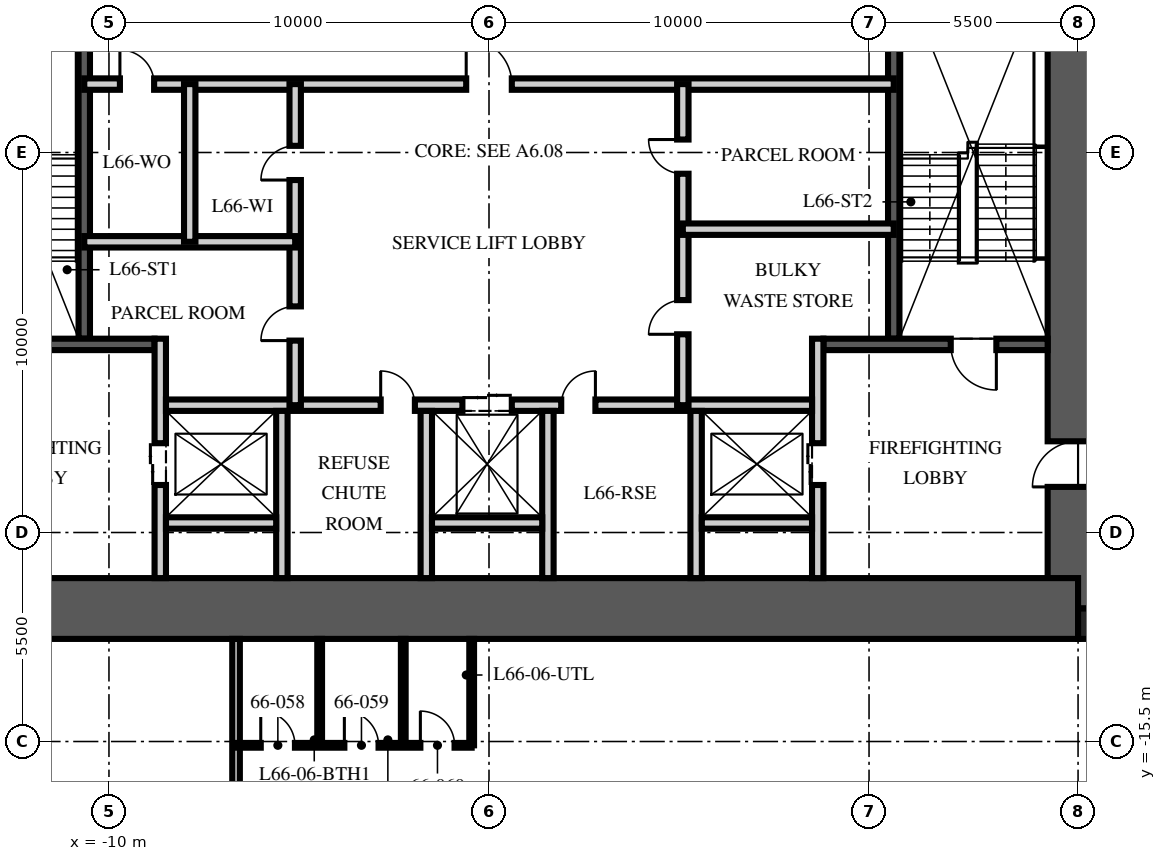
"""IFC4 building model, lengths in metres.
Left out: names, types, materials, properties, quantities, classifications, styles, units other than length and angle.
Written with IfcOpenShell. Run it as: python <this file> out.ifc"""

import sys

from ifc_helpers import new_model, si_unit, direction, frame, frame_2d, origin, origin_2d, place, context, subcontext, project, spatial, rectangle, extrude, element, fill, save


model = new_model("IFC4")
c1 = context("Model", 3, precision=1e-05, world=origin(), true_north=direction((0.0, 1.0)))
c2 = subcontext(c1, "Body", "Model", "MODEL_VIEW")
j1 = project(units=[si_unit("LENGTHUNIT", "METRE"), si_unit("PLANEANGLEUNIT", "RADIAN")], contexts=[c1])
p1 = place(None, origin())
s1 = spatial("IfcSite", under=j1, at=p1, CompositionType="ELEMENT")
p2 = place(p1, origin())
s2 = spatial("IfcBuilding", under=s1, at=p2, CompositionType="ELEMENT")
p3 = place(p2, frame((0.0, 0.0, 263.25)))
s3 = spatial("IfcBuildingStorey", under=s2, at=p3, CompositionType="ELEMENT", Elevation=263.25)
p4 = place(p3, frame((15.5, -12.0, -0.25), z_axis=(0.0, 0.0, 1.0), x_axis=(0.0, 1.0, 0.0)))
e1 = element("IfcWall", 1, at=p4, inside=s3, PredefinedType="SHEAR", context=c2, shape_type="SweptSolid", body=[
    extrude(rectangle(XDim=24.0, YDim=1.6, at=frame_2d((12.0, 0.0))), origin(), (0.0, 0.0, 1.0), 3.75),
])
p5 = place(p4, frame((3.2, 0.0, 0.25)))
e2 = element("IfcOpeningElement", 2, at=p5, cuts=e1, PredefinedType="OPENING", context=c2, shape_type="SweptSolid", body=[
    extrude(rectangle(XDim=1.2, YDim=2.1, at=frame_2d((0.6, 1.05))), frame((0.0, 0.81, 0.0), z_axis=(0.0, -1.0, 0.0), x_axis=(1.0, 0.0, 0.0)), (0.0, 0.0, 1.0), 1.62),
])
p6 = place(p4, frame((19.3, 0.0, 0.25)))
e3 = element("IfcOpeningElement", 3, at=p6, cuts=e1, PredefinedType="OPENING", context=c2, shape_type="SweptSolid", body=[
    extrude(rectangle(XDim=1.8, YDim=2.1, at=frame_2d((0.9, 1.05))), frame((0.0, 0.81, 0.0), z_axis=(0.0, -1.0, 0.0), x_axis=(1.0, 0.0, 0.0)), (0.0, 0.0, 1.0), 1.62),
])
p7 = place(p3, frame((-15.5, -12.0, -0.25), z_axis=(0.0, 0.0, 1.0), x_axis=(1.0, 0.0, 0.0)))
e4 = element("IfcWall", 4, at=p7, inside=s3, PredefinedType="SHEAR", context=c2, shape_type="SweptSolid", body=[
    extrude(rectangle(XDim=31.0, YDim=1.6, at=frame_2d((15.5, 0.0))), origin(), (0.0, 0.0, 1.0), 3.75),
])
p8 = place(p3, frame((15.9, -12.4, -0.25), z_axis=(0.0, 0.0, 1.0), x_axis=(1.0, 0.0, 0.0)))
e5 = element("IfcColumn", 5, at=p8, inside=s3, PredefinedType="COLUMN", context=c2, shape_type="SweptSolid", body=[
    extrude(rectangle(XDim=0.8, YDim=0.8, at=origin_2d()), origin(), (0.0, 0.0, 1.0), 3.75),
])
p9 = place(p3, frame((-10.65, -4.9, 0.0), z_axis=(0.0, 0.0, 1.0), x_axis=(0.0, 1.0, 0.0)))
e6 = element("IfcWall", 6, at=p9, inside=s3, PredefinedType="SOLIDWALL", context=c2, shape_type="SweptSolid", body=[
    extrude(rectangle(XDim=10.1, YDim=0.3, at=frame_2d((5.05, 0.0))), origin(), (0.0, 0.0, 1.0), 3.5),
])
p10 = place(p3, frame((-14.7, -5.05, 0.0), z_axis=(0.0, 0.0, 1.0), x_axis=(1.0, 0.0, 0.0)))
e7 = element("IfcWall", 7, at=p10, inside=s3, PredefinedType="SOLIDWALL", context=c2, shape_type="SweptSolid", body=[
    extrude(rectangle(XDim=5.9, YDim=0.3, at=frame_2d((2.95, 0.0))), origin(), (0.0, 0.0, 1.0), 3.5),
])
p11 = place(p10, frame((1.35, 0.0, 0.0)))
e8 = element("IfcOpeningElement", 8, at=p11, cuts=e7, PredefinedType="OPENING", context=c2, shape_type="SweptSolid", body=[
    extrude(rectangle(XDim=1.2, YDim=2.1, at=frame_2d((0.6, 1.05))), frame((0.0, 0.16, 0.0), z_axis=(0.0, -1.0, 0.0), x_axis=(1.0, 0.0, 0.0)), (0.0, 0.0, 1.0), 0.32),
])
p12 = place(p3, frame((-8.65, -11.2, 0.0), z_axis=(0.0, 0.0, 1.0), x_axis=(0.0, 1.0, 0.0)))
e9 = element("IfcWall", 9, at=p12, inside=s3, PredefinedType="PARTITIONING", context=c2, shape_type="SweptSolid", body=[
    extrude(rectangle(XDim=6.3, YDim=0.3, at=frame_2d((3.15, 0.0))), origin(), (0.0, 0.0, 1.0), 3.5),
])
p13 = place(p12, frame((2.45, 0.0, 0.0)))
e10 = element("IfcOpeningElement", 10, at=p13, cuts=e9, PredefinedType="OPENING", context=c2, shape_type="SweptSolid", body=[
    extrude(rectangle(XDim=1.1, YDim=2.1, at=frame_2d((0.55, 1.05))), frame((0.0, 0.16, 0.0), z_axis=(0.0, -1.0, 0.0), x_axis=(1.0, 0.0, 0.0)), (0.0, 0.0, 1.0), 0.32),
])
p14 = place(p3, frame((10.65, -4.9, 0.0), z_axis=(0.0, 0.0, 1.0), x_axis=(0.0, 1.0, 0.0)))
e11 = element("IfcWall", 11, at=p14, inside=s3, PredefinedType="SOLIDWALL", context=c2, shape_type="SweptSolid", body=[
    extrude(rectangle(XDim=10.1, YDim=0.3, at=frame_2d((5.05, 0.0))), origin(), (0.0, 0.0, 1.0), 3.5),
])
p15 = place(p3, frame((14.7, -5.05, 0.0), z_axis=(0.0, 0.0, 1.0), x_axis=(-1.0, 0.0, 0.0)))
e12 = element("IfcWall", 12, at=p15, inside=s3, PredefinedType="SOLIDWALL", context=c2, shape_type="SweptSolid", body=[
    extrude(rectangle(XDim=5.9, YDim=0.3, at=frame_2d((2.95, 0.0))), origin(), (0.0, 0.0, 1.0), 3.5),
])
p16 = place(p15, frame((1.35, 0.0, 0.0)))
e13 = element("IfcOpeningElement", 13, at=p16, cuts=e12, PredefinedType="OPENING", context=c2, shape_type="SweptSolid", body=[
    extrude(rectangle(XDim=1.2, YDim=2.1, at=frame_2d((0.6, 1.05))), frame((0.0, 0.16, 0.0), z_axis=(0.0, -1.0, 0.0), x_axis=(1.0, 0.0, 0.0)), (0.0, 0.0, 1.0), 0.32),
])
p17 = place(p3, frame((8.65, -11.2, 0.0), z_axis=(0.0, 0.0, 1.0), x_axis=(0.0, 1.0, 0.0)))
e14 = element("IfcWall", 14, at=p17, inside=s3, PredefinedType="PARTITIONING", context=c2, shape_type="SweptSolid", body=[
    extrude(rectangle(XDim=6.3, YDim=0.3, at=frame_2d((3.15, 0.0))), origin(), (0.0, 0.0, 1.0), 3.5),
])
p18 = place(p17, frame((2.45, 0.0, 0.0)))
e15 = element("IfcOpeningElement", 15, at=p18, cuts=e14, PredefinedType="OPENING", context=c2, shape_type="SweptSolid", body=[
    extrude(rectangle(XDim=1.1, YDim=2.1, at=frame_2d((0.55, 1.05))), frame((0.0, 0.16, 0.0), z_axis=(0.0, -1.0, 0.0), x_axis=(1.0, 0.0, 0.0)), (0.0, 0.0, 1.0), 0.32),
])
p19 = place(p3, frame((-8.5, -6.65, 0.0), z_axis=(0.0, 0.0, 1.0), x_axis=(1.0, 0.0, 0.0)))
e16 = element("IfcWall", 16, at=p19, inside=s3, PredefinedType="PARTITIONING", context=c2, shape_type="SweptSolid", body=[
    extrude(rectangle(XDim=17.0, YDim=0.3, at=frame_2d((8.5, 0.0))), origin(), (0.0, 0.0, 1.0), 3.5),
])
p20 = place(p19, frame((7.8, 0.0, 0.0)))
e17 = element("IfcOpeningElement", 17, at=p20, cuts=e16, PredefinedType="OPENING", context=c2, shape_type="SweptSolid", body=[
    extrude(rectangle(XDim=1.3, YDim=2.4, at=frame_2d((0.65, 1.2))), frame((0.0, 0.16, 0.0), z_axis=(0.0, -1.0, 0.0), x_axis=(1.0, 0.0, 0.0)), (0.0, 0.0, 1.0), 0.32),
])
p21 = place(p19, frame((5.65, 0.0, 0.0)))
e18 = element("IfcOpeningElement", 18, at=p21, cuts=e16, PredefinedType="OPENING", context=c2, shape_type="SweptSolid", body=[
    extrude(rectangle(XDim=0.9, YDim=2.1, at=frame_2d((0.45, 1.05))), frame((0.0, 0.16, 0.0), z_axis=(0.0, -1.0, 0.0), x_axis=(1.0, 0.0, 0.0)), (0.0, 0.0, 1.0), 0.32),
])
p22 = place(p19, frame((10.4, 0.0, 0.0)))
e19 = element("IfcOpeningElement", 19, at=p22, cuts=e16, PredefinedType="OPENING", context=c2, shape_type="SweptSolid", body=[
    extrude(rectangle(XDim=0.9, YDim=2.1, at=frame_2d((0.45, 1.05))), frame((0.0, 0.16, 0.0), z_axis=(0.0, -1.0, 0.0), x_axis=(1.0, 0.0, 0.0)), (0.0, 0.0, 1.0), 0.32),
])
for number, where, z_axis, x_axis in (
    (20, (-5.45, -11.2, 0.0), (0.0, 0.0, 1.0), (0.0, 1.0, 0.0)),
    (21, (-1.65, -11.2, 0.0), (0.0, 0.0, 1.0), (0.0, 1.0, 0.0)),
    (22, (1.55, -11.2, 0.0), (0.0, 0.0, 1.0), (0.0, 1.0, 0.0)),
    (23, (5.45, -11.2, 0.0), (0.0, 0.0, 1.0), (0.0, 1.0, 0.0)),
):
    element("IfcWall", number, at=place(p3, frame(where, z_axis=z_axis, x_axis=x_axis)), inside=s3, PredefinedType="PARTITIONING", context=c2, shape_type="SweptSolid", body=[
        extrude(rectangle(XDim=4.4, YDim=0.3, at=frame_2d((2.2, 0.0))), origin(), (0.0, 0.0, 1.0), 3.5),
    ])
for number, where, z_axis, x_axis in (
    (24, (-8.5, -9.75, 0.0), (0.0, 0.0, 1.0), (1.0, 0.0, 0.0)),
    (25, (-1.5, -9.75, 0.0), (0.0, 0.0, 1.0), (1.0, 0.0, 0.0)),
    (26, (5.6, -9.75, 0.0), (0.0, 0.0, 1.0), (1.0, 0.0, 0.0)),
):
    element("IfcWall", number, at=place(p3, frame(where, z_axis=z_axis, x_axis=x_axis)), inside=s3, PredefinedType="PARTITIONING", context=c2, shape_type="SweptSolid", body=[
        extrude(rectangle(XDim=2.9, YDim=0.3, at=frame_2d((1.45, 0.0))), origin(), (0.0, 0.0, 1.0), 3.5),
    ])
p23 = place(p3, frame((-10.65, 1.8, 0.0), z_axis=(0.0, 0.0, 1.0), x_axis=(1.0, 0.0, 0.0)))
e27 = element("IfcWall", 27, at=p23, inside=s3, PredefinedType="PARTITIONING", context=c2, shape_type="SweptSolid", body=[
    extrude(rectangle(XDim=21.3, YDim=0.3, at=frame_2d((10.65, 0.0))), origin(), (0.0, 0.0, 1.0), 3.5),
])
p24 = place(p23, frame((10.05, 0.0, 0.0)))
e28 = element("IfcOpeningElement", 28, at=p24, cuts=e27, PredefinedType="OPENING", context=c2, shape_type="SweptSolid", body=[
    extrude(rectangle(XDim=1.2, YDim=2.1, at=frame_2d((0.6, 1.05))), frame((0.0, 0.16, 0.0), z_axis=(0.0, -1.0, 0.0), x_axis=(1.0, 0.0, 0.0)), (0.0, 0.0, 1.0), 0.32),
])
p25 = place(p23, frame((0.938, 0.0, 0.0)))
e29 = element("IfcOpeningElement", 29, at=p25, cuts=e27, PredefinedType="OPENING", context=c2, shape_type="SweptSolid", body=[
    extrude(rectangle(XDim=0.9, YDim=2.1, at=frame_2d((0.45, 1.05))), frame((0.0, 0.16, 0.0), z_axis=(0.0, -1.0, 0.0), x_axis=(1.0, 0.0, 0.0)), (0.0, 0.0, 1.0), 0.32),
])
p26 = place(p3, frame((-5.1, -6.65, 0.0), z_axis=(0.0, 0.0, 1.0), x_axis=(0.0, 1.0, 0.0)))
e30 = element("IfcWall", 30, at=p26, inside=s3, PredefinedType="PARTITIONING", context=c2, shape_type="SweptSolid", body=[
    extrude(rectangle(XDim=8.45, YDim=0.3, at=frame_2d((4.225, 0.0))), origin(), (0.0, 0.0, 1.0), 3.5),
])
p27 = place(p26, frame((1.7, 0.0, 0.0)))
e31 = element("IfcOpeningElement", 31, at=p27, cuts=e30, PredefinedType="OPENING", context=c2, shape_type="SweptSolid", body=[
    extrude(rectangle(XDim=0.9, YDim=2.1, at=frame_2d((0.45, 1.05))), frame((0.0, 0.16, 0.0), z_axis=(0.0, -1.0, 0.0), x_axis=(1.0, 0.0, 0.0)), (0.0, 0.0, 1.0), 0.32),
])
p28 = place(p26, frame((5.925, 0.0, 0.0)))
e32 = element("IfcOpeningElement", 32, at=p28, cuts=e30, PredefinedType="OPENING", context=c2, shape_type="SweptSolid", body=[
    extrude(rectangle(XDim=0.9, YDim=2.1, at=frame_2d((0.45, 1.05))), frame((0.0, 0.16, 0.0), z_axis=(0.0, -1.0, 0.0), x_axis=(1.0, 0.0, 0.0)), (0.0, 0.0, 1.0), 0.32),
])
p29 = place(p3, frame((5.1, -6.65, 0.0), z_axis=(0.0, 0.0, 1.0), x_axis=(0.0, 1.0, 0.0)))
e33 = element("IfcWall", 33, at=p29, inside=s3, PredefinedType="PARTITIONING", context=c2, shape_type="SweptSolid", body=[
    extrude(rectangle(XDim=8.45, YDim=0.3, at=frame_2d((4.225, 0.0))), origin(), (0.0, 0.0, 1.0), 3.5),
])
p30 = place(p29, frame((1.866, 0.0, 0.0)))
e34 = element("IfcOpeningElement", 34, at=p30, cuts=e33, PredefinedType="OPENING", context=c2, shape_type="SweptSolid", body=[
    extrude(rectangle(XDim=0.9, YDim=2.1, at=frame_2d((0.45, 1.05))), frame((0.0, 0.16, 0.0), z_axis=(0.0, -1.0, 0.0), x_axis=(1.0, 0.0, 0.0)), (0.0, 0.0, 1.0), 0.32),
])
p31 = place(p29, frame((6.091, 0.0, 0.0)))
e35 = element("IfcOpeningElement", 35, at=p31, cuts=e33, PredefinedType="OPENING", context=c2, shape_type="SweptSolid", body=[
    extrude(rectangle(XDim=0.9, YDim=2.1, at=frame_2d((0.45, 1.05))), frame((0.0, 0.16, 0.0), z_axis=(0.0, -1.0, 0.0), x_axis=(1.0, 0.0, 0.0)), (0.0, 0.0, 1.0), 0.32),
])
p32 = place(p3, frame((-10.65, -2.35, 0.0), z_axis=(0.0, 0.0, 1.0), x_axis=(1.0, 0.0, 0.0)))
e36 = element("IfcWall", 36, at=p32, inside=s3, PredefinedType="PARTITIONING", context=c2, shape_type="SweptSolid", body=[
    extrude(rectangle(XDim=5.55, YDim=0.3, at=frame_2d((2.775, 0.0))), origin(), (0.0, 0.0, 1.0), 3.5),
])
p33 = place(p3, frame((-7.875, -2.35, 0.0), z_axis=(0.0, 0.0, 1.0), x_axis=(0.0, 1.0, 0.0)))
e37 = element("IfcWall", 37, at=p33, inside=s3, PredefinedType="PARTITIONING", context=c2, shape_type="SweptSolid", body=[
    extrude(rectangle(XDim=4.15, YDim=0.3, at=frame_2d((2.075, 0.0))), origin(), (0.0, 0.0, 1.0), 3.5),
])
p34 = place(p3, frame((10.65, -2.018, 0.0), z_axis=(0.0, 0.0, 1.0), x_axis=(-1.0, 0.0, 0.0)))
e38 = element("IfcWall", 38, at=p34, inside=s3, PredefinedType="PARTITIONING", context=c2, shape_type="SweptSolid", body=[
    extrude(rectangle(XDim=5.55, YDim=0.3, at=frame_2d((2.775, 0.0))), origin(), (0.0, 0.0, 1.0), 3.5),
])
p35 = place(p3, frame((-6.656, -12.8, 0.0), z_axis=(0.0, 0.0, 1.0), x_axis=(0.0, -1.0, 0.0)))
e39 = element("IfcWall", 39, at=p35, inside=s3, PredefinedType="PARTITIONING", context=c2, shape_type="SweptSolid", body=[
    extrude(rectangle(XDim=12.65, YDim=0.2, at=frame_2d((6.325, 0.0))), origin(), (0.0, 0.0, 1.0), 2.91),
])
p36 = place(p3, frame((-6.656, -15.6, 0.0), z_axis=(0.0, 0.0, 1.0), x_axis=(1.0, 0.0, 0.0)))
e40 = element("IfcWall", 40, at=p36, inside=s3, PredefinedType="PARTITIONING", context=c2, shape_type="SweptSolid", body=[
    extrude(rectangle(XDim=6.2, YDim=0.125, at=frame_2d((3.1, 0.0))), origin(), (0.0, 0.0, 1.0), 2.81),
])
p37 = place(p36, frame((0.65, 0.0, 0.0)))
e41 = element("IfcOpeningElement", 41, at=p37, cuts=e40, PredefinedType="OPENING", context=c2, shape_type="SweptSolid", body=[
    extrude(rectangle(XDim=0.9, YDim=2.1, at=frame_2d((0.45, 1.05))), frame((0.0, 0.073, 0.0), z_axis=(0.0, -1.0, 0.0), x_axis=(1.0, 0.0, 0.0)), (0.0, 0.0, 1.0), 0.145),
])
p38 = place(p36, frame((2.85, 0.0, 0.0)))
e42 = element("IfcOpeningElement", 42, at=p38, cuts=e40, PredefinedType="OPENING", context=c2, shape_type="SweptSolid", body=[
    extrude(rectangle(XDim=0.9, YDim=2.1, at=frame_2d((0.45, 1.05))), frame((0.0, 0.073, 0.0), z_axis=(0.0, -1.0, 0.0), x_axis=(1.0, 0.0, 0.0)), (0.0, 0.0, 1.0), 0.145),
])
p39 = place(p36, frame((4.85, 0.0, 0.0)))
e43 = element("IfcOpeningElement", 43, at=p39, cuts=e40, PredefinedType="OPENING", context=c2, shape_type="SweptSolid", body=[
    extrude(rectangle(XDim=0.9, YDim=2.1, at=frame_2d((0.45, 1.05))), frame((0.0, 0.073, 0.0), z_axis=(0.0, -1.0, 0.0), x_axis=(1.0, 0.0, 0.0)), (0.0, 0.0, 1.0), 0.145),
])
for number, where, z_axis, x_axis in (
    (44, (-4.456, -12.8, 0.0), (0.0, 0.0, 1.0), (0.0, -1.0, 0.0)),
    (45, (-2.256, -12.8, 0.0), (0.0, 0.0, 1.0), (0.0, -1.0, 0.0)),
    (46, (-0.456, -12.8, 0.0), (0.0, 0.0, 1.0), (0.0, -1.0, 0.0)),
):
    element("IfcWall", number, at=place(p3, frame(where, z_axis=z_axis, x_axis=x_axis)), inside=s3, PredefinedType="PARTITIONING", context=c2, shape_type="SweptSolid", body=[
        extrude(rectangle(XDim=2.8, YDim=0.125, at=frame_2d((1.4, 0.0))), origin(), (0.0, 0.0, 1.0), 3.5),
    ])
p40 = place(p16, origin())
e47 = element("IfcDoor", 47, at=p40, inside=s3, OperationType="SINGLE_SWING_LEFT", PredefinedType="DOOR", context=c2, shape_type="SweptSolid", body=[
    extrude(rectangle(XDim=1.2, YDim=2.1, at=frame_2d((0.6, 1.05))), frame((0.0, 0.025, 0.0), z_axis=(0.0, -1.0, 0.0), x_axis=(1.0, 0.0, 0.0)), (0.0, 0.0, 1.0), 0.05),
])
fill(e13, e47)
p41 = place(p5, origin())
e48 = element("IfcDoor", 48, at=p41, inside=s3, OperationType="SINGLE_SWING_LEFT", PredefinedType="DOOR", context=c2, shape_type="SweptSolid", body=[
    extrude(rectangle(XDim=1.2, YDim=2.1, at=frame_2d((0.6, 1.05))), frame((0.0, 0.025, 0.0), z_axis=(0.0, -1.0, 0.0), x_axis=(1.0, 0.0, 0.0)), (0.0, 0.0, 1.0), 0.05),
])
fill(e2, e48)
p42 = place(p13, origin())
e49 = element("IfcDoor", 49, at=p42, inside=s3, OperationType="DOUBLE_DOOR_SLIDING", PredefinedType="DOOR", context=c2, shape_type="SweptSolid", body=[
    extrude(rectangle(XDim=1.1, YDim=2.1, at=frame_2d((0.55, 1.05))), frame((0.0, 0.025, 0.0), z_axis=(0.0, -1.0, 0.0), x_axis=(1.0, 0.0, 0.0)), (0.0, 0.0, 1.0), 0.05),
])
fill(e10, e49)
p43 = place(p18, origin())
e50 = element("IfcDoor", 50, at=p43, inside=s3, OperationType="DOUBLE_DOOR_SLIDING", PredefinedType="DOOR", context=c2, shape_type="SweptSolid", body=[
    extrude(rectangle(XDim=1.1, YDim=2.1, at=frame_2d((0.55, 1.05))), frame((0.0, 0.025, 0.0), z_axis=(0.0, -1.0, 0.0), x_axis=(1.0, 0.0, 0.0)), (0.0, 0.0, 1.0), 0.05),
])
fill(e15, e50)
p44 = place(p20, origin())
e51 = element("IfcDoor", 51, at=p44, inside=s3, OperationType="DOUBLE_DOOR_SLIDING", PredefinedType="DOOR", context=c2, shape_type="SweptSolid", body=[
    extrude(rectangle(XDim=1.3, YDim=2.4, at=frame_2d((0.65, 1.2))), frame((0.0, 0.025, 0.0), z_axis=(0.0, -1.0, 0.0), x_axis=(1.0, 0.0, 0.0)), (0.0, 0.0, 1.0), 0.05),
])
fill(e17, e51)
p45 = place(p24, origin())
e52 = element("IfcDoor", 52, at=p45, inside=s3, OperationType="SINGLE_SWING_LEFT", PredefinedType="DOOR", context=c2, shape_type="SweptSolid", body=[
    extrude(rectangle(XDim=1.2, YDim=2.1, at=frame_2d((0.6, 1.05))), frame((0.0, 0.025, 0.0), z_axis=(0.0, -1.0, 0.0), x_axis=(1.0, 0.0, 0.0)), (0.0, 0.0, 1.0), 0.05),
])
fill(e28, e52)
p46 = place(p21, origin())
e53 = element("IfcDoor", 53, at=p46, inside=s3, OperationType="SINGLE_SWING_LEFT", PredefinedType="DOOR", context=c2, shape_type="SweptSolid", body=[
    extrude(rectangle(XDim=0.9, YDim=2.1, at=frame_2d((0.45, 1.05))), frame((0.0, 0.025, 0.0), z_axis=(0.0, -1.0, 0.0), x_axis=(1.0, 0.0, 0.0)), (0.0, 0.0, 1.0), 0.05),
])
fill(e18, e53)
p47 = place(p22, origin())
e54 = element("IfcDoor", 54, at=p47, inside=s3, OperationType="SINGLE_SWING_RIGHT", PredefinedType="DOOR", context=c2, shape_type="SweptSolid", body=[
    extrude(rectangle(XDim=0.9, YDim=2.1, at=frame_2d((0.45, 1.05))), frame((0.0, 0.025, 0.0), z_axis=(0.0, -1.0, 0.0), x_axis=(1.0, 0.0, 0.0)), (0.0, 0.0, 1.0), 0.05),
])
fill(e19, e54)
p48 = place(p27, origin())
e55 = element("IfcDoor", 55, at=p48, inside=s3, OperationType="SINGLE_SWING_LEFT", PredefinedType="DOOR", context=c2, shape_type="SweptSolid", body=[
    extrude(rectangle(XDim=0.9, YDim=2.1, at=frame_2d((0.45, 1.05))), frame((0.0, 0.025, 0.0), z_axis=(0.0, -1.0, 0.0), x_axis=(1.0, 0.0, 0.0)), (0.0, 0.0, 1.0), 0.05),
])
fill(e31, e55)
p49 = place(p28, origin())
e56 = element("IfcDoor", 56, at=p49, inside=s3, OperationType="SINGLE_SWING_LEFT", PredefinedType="DOOR", context=c2, shape_type="SweptSolid", body=[
    extrude(rectangle(XDim=0.9, YDim=2.1, at=frame_2d((0.45, 1.05))), frame((0.0, 0.025, 0.0), z_axis=(0.0, -1.0, 0.0), x_axis=(1.0, 0.0, 0.0)), (0.0, 0.0, 1.0), 0.05),
])
fill(e32, e56)
p50 = place(p25, origin())
e57 = element("IfcDoor", 57, at=p50, inside=s3, OperationType="SINGLE_SWING_LEFT", PredefinedType="DOOR", context=c2, shape_type="SweptSolid", body=[
    extrude(rectangle(XDim=0.9, YDim=2.1, at=frame_2d((0.45, 1.05))), frame((0.0, 0.025, 0.0), z_axis=(0.0, -1.0, 0.0), x_axis=(1.0, 0.0, 0.0)), (0.0, 0.0, 1.0), 0.05),
])
fill(e29, e57)
p51 = place(p30, origin())
e58 = element("IfcDoor", 58, at=p51, inside=s3, OperationType="SINGLE_SWING_LEFT", PredefinedType="DOOR", context=c2, shape_type="SweptSolid", body=[
    extrude(rectangle(XDim=0.9, YDim=2.1, at=frame_2d((0.45, 1.05))), frame((0.0, 0.025, 0.0), z_axis=(0.0, -1.0, 0.0), x_axis=(1.0, 0.0, 0.0)), (0.0, 0.0, 1.0), 0.05),
])
fill(e34, e58)
p52 = place(p31, origin())
e59 = element("IfcDoor", 59, at=p52, inside=s3, OperationType="SINGLE_SWING_RIGHT", PredefinedType="DOOR", context=c2, shape_type="SweptSolid", body=[
    extrude(rectangle(XDim=0.9, YDim=2.1, at=frame_2d((0.45, 1.05))), frame((0.0, 0.025, 0.0), z_axis=(0.0, -1.0, 0.0), x_axis=(1.0, 0.0, 0.0)), (0.0, 0.0, 1.0), 0.05),
])
fill(e35, e59)
p53 = place(p37, origin())
e60 = element("IfcDoor", 60, at=p53, inside=s3, OperationType="SINGLE_SWING_LEFT", PredefinedType="DOOR", context=c2, shape_type="SweptSolid", body=[
    extrude(rectangle(XDim=0.9, YDim=2.1, at=frame_2d((0.45, 1.05))), frame((0.0, 0.025, 0.0), z_axis=(0.0, -1.0, 0.0), x_axis=(1.0, 0.0, 0.0)), (0.0, 0.0, 1.0), 0.05),
])
fill(e41, e60)
p54 = place(p38, origin())
e61 = element("IfcDoor", 61, at=p54, inside=s3, OperationType="SINGLE_SWING_LEFT", PredefinedType="DOOR", context=c2, shape_type="SweptSolid", body=[
    extrude(rectangle(XDim=0.9, YDim=2.1, at=frame_2d((0.45, 1.05))), frame((0.0, 0.025, 0.0), z_axis=(0.0, -1.0, 0.0), x_axis=(1.0, 0.0, 0.0)), (0.0, 0.0, 1.0), 0.05),
])
fill(e42, e61)
p55 = place(p39, origin())
e62 = element("IfcDoor", 62, at=p55, inside=s3, OperationType="SINGLE_SWING_LEFT", PredefinedType="DOOR", context=c2, shape_type="SweptSolid", body=[
    extrude(rectangle(XDim=0.9, YDim=2.1, at=frame_2d((0.45, 1.05))), frame((0.0, 0.025, 0.0), z_axis=(0.0, -1.0, 0.0), x_axis=(1.0, 0.0, 0.0)), (0.0, 0.0, 1.0), 0.05),
])
fill(e43, e62)
save(model, sys.argv[1])
